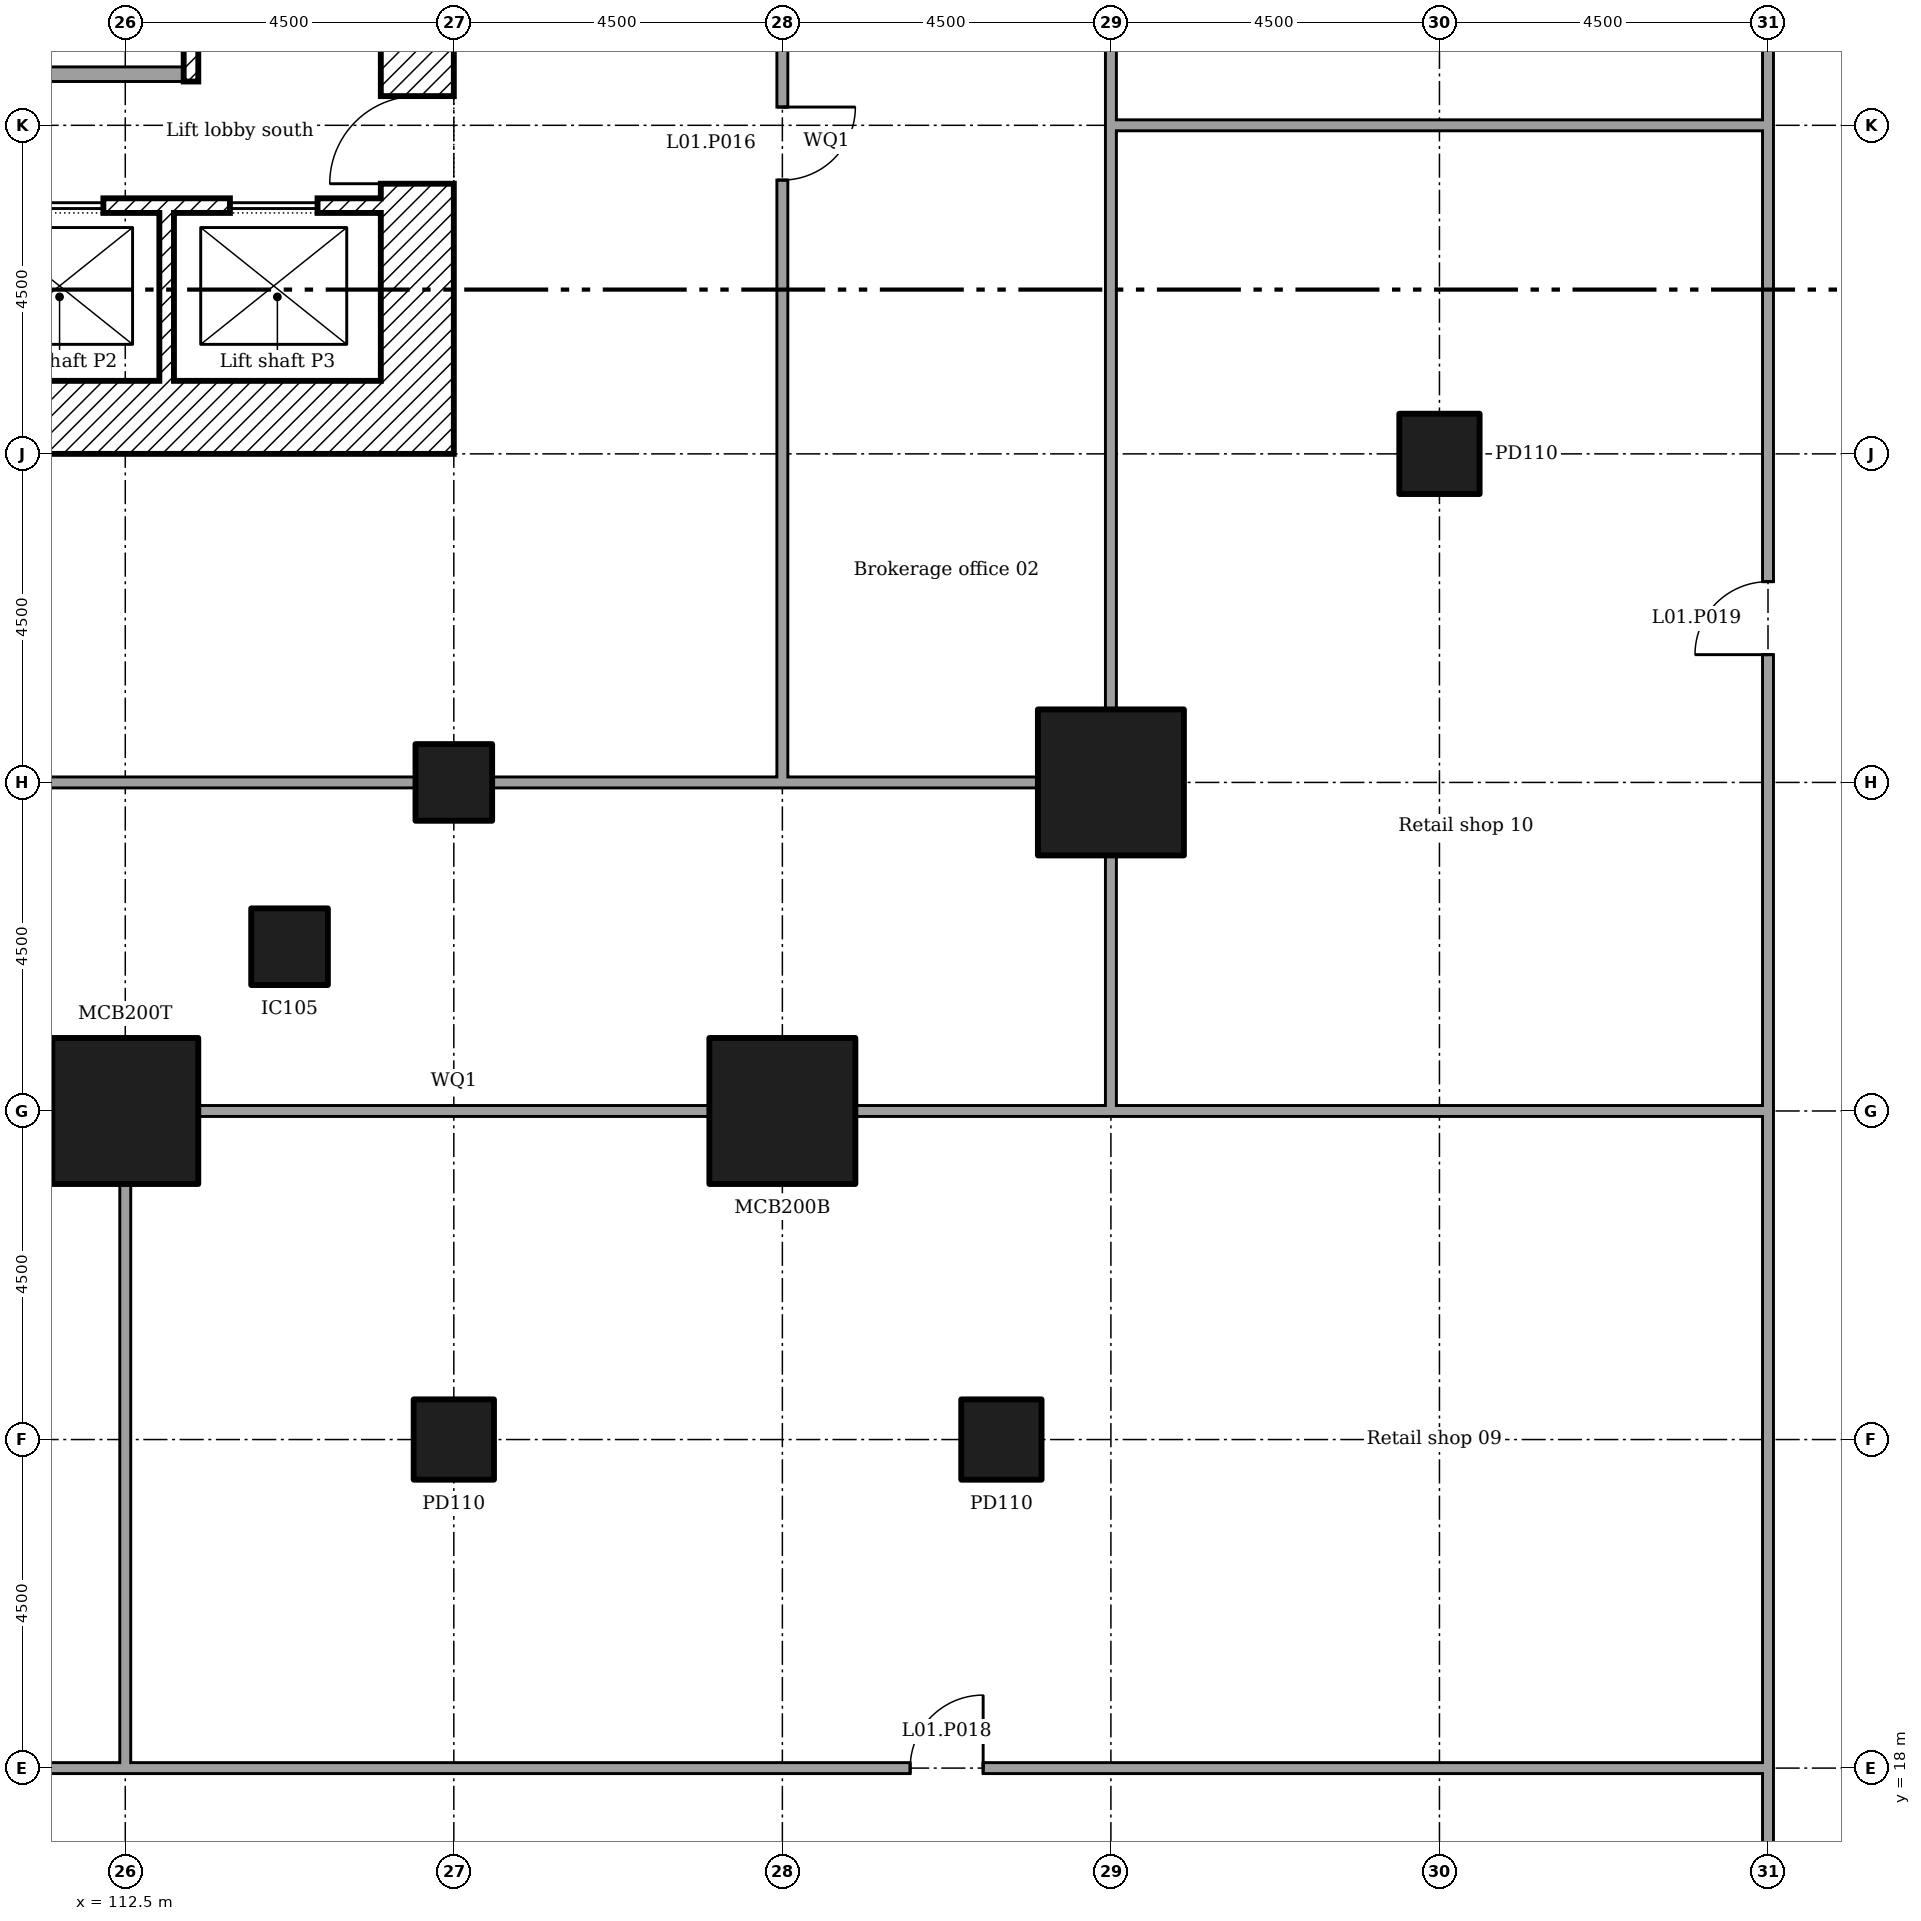
"""IFC4 building model, lengths in metres.
Left out: names, types, materials, properties, quantities, classifications, styles, units other than length and angle.
Written with IfcOpenShell. Run it as: python <this file> out.ifc"""

import sys

from ifc_helpers import new_model, si_unit, direction, frame, frame_2d, origin, origin_2d, place, context, subcontext, project, spatial, rectangle, extrude, element, fill, save


model = new_model("IFC4")
c1 = context("Model", 3, precision=1e-05, world=origin(), true_north=direction((0.0, 1.0)))
c2 = subcontext(c1, "Body", "Model", "MODEL_VIEW")
j1 = project(units=[si_unit("LENGTHUNIT", "METRE"), si_unit("PLANEANGLEUNIT", "RADIAN")], contexts=[c1])
p1 = place(None, origin())
s1 = spatial("IfcSite", under=j1, at=p1, CompositionType="ELEMENT")
p2 = place(p1, origin())
s2 = spatial("IfcBuilding", under=s1, at=p2, CompositionType="ELEMENT")
p3 = place(p2, frame((0.0, 0.0, 6.0)))
s3 = spatial("IfcBuildingStorey", under=s2, at=p3, CompositionType="ELEMENT", Elevation=6.0)
for number, where in (
    (1, (112.5, 27.0, 0.0)),
    (2, (121.5, 27.0, 0.0)),
    (3, (126.0, 31.5, 0.0)),
):
    element("IfcColumn", number, at=place(p3, frame(where)), inside=s3, PredefinedType="COLUMN", context=c2, shape_type="SweptSolid", body=[
        extrude(rectangle(XDim=2.0, YDim=2.0, at=origin_2d()), origin(), (0.0, 0.0, 1.0), 5.5),
    ])
for number, where in (
    (4, (114.75, 29.25, 0.0)),
    (5, (117.0, 31.5, 0.0)),
):
    element("IfcColumn", number, at=place(p3, frame(where)), inside=s3, PredefinedType="COLUMN", context=c2, shape_type="SweptSolid", body=[
        extrude(rectangle(XDim=1.05, YDim=1.05, at=origin_2d()), origin(), (0.0, 0.0, 1.0), 5.5),
    ])
for number, where in (
    (6, (117.0, 22.5, 0.0)),
    (7, (124.5, 22.5, 0.0)),
    (8, (130.5, 36.0, 0.0)),
):
    element("IfcColumn", number, at=place(p3, frame(where)), inside=s3, PredefinedType="COLUMN", context=c2, shape_type="SweptSolid", body=[
        extrude(rectangle(XDim=1.1, YDim=1.1, at=origin_2d()), origin(), (0.0, 0.0, 1.0), 5.5),
    ])
p4 = place(p3, frame((116.5, 36.0, 0.0), z_axis=(0.0, 0.0, 1.0), x_axis=(0.0, 1.0, 0.0)))
e9 = element("IfcWall", 9, at=p4, inside=s3, PredefinedType="SHEAR", context=c2, shape_type="SweptSolid", body=[
    extrude(rectangle(XDim=13.5, YDim=1.0, at=frame_2d((6.75, 0.0))), origin(), (0.0, 0.0, 1.0), 5.0),
])
p5 = place(p4, frame((3.7, 0.0, 0.0)))
e10 = element("IfcOpeningElement", 10, at=p5, cuts=e9, PredefinedType="OPENING", context=c2, shape_type="SweptSolid", body=[
    extrude(rectangle(XDim=1.2, YDim=2.1, at=frame_2d((0.6, 1.05))), frame((0.0, 0.51, 0.0), z_axis=(0.0, -1.0, 0.0), x_axis=(1.0, 0.0, 0.0)), (0.0, 0.0, 1.0), 1.02),
])
p6 = place(p4, frame((6.275, 0.0, 0.0)))
e11 = element("IfcOpeningElement", 11, at=p6, cuts=e9, PredefinedType="OPENING", context=c2, shape_type="SweptSolid", body=[
    extrude(rectangle(XDim=1.0, YDim=2.1, at=frame_2d((0.5, 1.05))), frame((0.0, 0.51, 0.0), z_axis=(0.0, -1.0, 0.0), x_axis=(1.0, 0.0, 0.0)), (0.0, 0.0, 1.0), 1.02),
])
p7 = place(p3, frame((104.5, 36.5, 0.0)))
e12 = element("IfcWall", 12, at=p7, inside=s3, PredefinedType="SHEAR", context=c2, shape_type="SweptSolid", body=[
    extrude(rectangle(XDim=11.5, YDim=1.0, at=frame_2d((5.75, 0.0))), origin(), (0.0, 0.0, 1.0), 5.0),
])
p8 = place(p3, frame((113.067, 37.0, 0.0), z_axis=(0.0, 0.0, 1.0), x_axis=(0.0, 1.0, 0.0)))
e13 = element("IfcWall", 13, at=p8, inside=s3, PredefinedType="SHEAR", context=c2, shape_type="SweptSolid", body=[
    extrude(rectangle(XDim=2.3, YDim=0.2, at=frame_2d((1.15, 0.0))), origin(), (0.0, 0.0, 1.0), 5.0),
])
p9 = place(p3, frame((107.2, 39.4, 0.0)))
e14 = element("IfcWall", 14, at=p9, inside=s3, PredefinedType="SHEAR", context=c2, shape_type="SweptSolid", body=[
    extrude(rectangle(XDim=8.8, YDim=0.2, at=frame_2d((4.4, 0.0))), origin(), (0.0, 0.0, 1.0), 5.0),
])
p10 = place(p9, frame((0.867, 0.0, 0.0)))
e15 = element("IfcOpeningElement", 15, at=p10, cuts=e14, PredefinedType="OPENING", context=c2, shape_type="SweptSolid", body=[
    extrude(rectangle(XDim=1.2, YDim=2.1, at=frame_2d((0.6, 1.05))), frame((0.0, 0.11, 0.0), z_axis=(0.0, -1.0, 0.0), x_axis=(1.0, 0.0, 0.0)), (0.0, 0.0, 1.0), 0.22),
])
p11 = place(p9, frame((3.8, 0.0, 0.0)))
e16 = element("IfcOpeningElement", 16, at=p11, cuts=e14, PredefinedType="OPENING", context=c2, shape_type="SweptSolid", body=[
    extrude(rectangle(XDim=1.2, YDim=2.1, at=frame_2d((0.6, 1.05))), frame((0.0, 0.11, 0.0), z_axis=(0.0, -1.0, 0.0), x_axis=(1.0, 0.0, 0.0)), (0.0, 0.0, 1.0), 0.22),
])
p12 = place(p9, frame((6.733, 0.0, 0.0)))
e17 = element("IfcOpeningElement", 17, at=p12, cuts=e14, PredefinedType="OPENING", context=c2, shape_type="SweptSolid", body=[
    extrude(rectangle(XDim=1.2, YDim=2.1, at=frame_2d((0.6, 1.05))), frame((0.0, 0.11, 0.0), z_axis=(0.0, -1.0, 0.0), x_axis=(1.0, 0.0, 0.0)), (0.0, 0.0, 1.0), 0.22),
])
p13 = place(p3, frame((113.4, 41.1, 0.0), z_axis=(0.0, 0.0, 1.0), x_axis=(0.0, 1.0, 0.0)))
e18 = element("IfcWall", 18, at=p13, inside=s3, PredefinedType="SHEAR", context=c2, shape_type="SweptSolid", body=[
    extrude(rectangle(XDim=7.4, YDim=0.2, at=frame_2d((3.7, 0.0))), origin(), (0.0, 0.0, 1.0), 5.0),
])
p14 = place(p3, frame((107.2, 41.2, 0.0)))
e19 = element("IfcWall", 19, at=p14, inside=s3, PredefinedType="PARTITIONING", context=c2, shape_type="SweptSolid", body=[
    extrude(rectangle(XDim=6.1, YDim=0.2, at=frame_2d((3.05, 0.0))), origin(), (0.0, 0.0, 1.0), 5.0),
])
p15 = place(p14, frame((1.2, 0.0, 0.0)))
e20 = element("IfcOpeningElement", 20, at=p15, cuts=e19, PredefinedType="OPENING", context=c2, shape_type="SweptSolid", body=[
    extrude(rectangle(XDim=0.9, YDim=2.1, at=frame_2d((0.45, 1.05))), frame((0.0, 0.11, 0.0), z_axis=(0.0, -1.0, 0.0), x_axis=(1.0, 0.0, 0.0)), (0.0, 0.0, 1.0), 0.22),
])
p16 = place(p3, frame((135.0, 9.3, 0.0), z_axis=(0.0, 0.0, 1.0), x_axis=(0.0, 1.0, 0.0)))
e21 = element("IfcWall", 21, at=p16, inside=s3, PredefinedType="PARTITIONING", context=c2, shape_type="SweptSolid", body=[
    extrude(rectangle(XDim=8.775, YDim=0.15, at=frame_2d((4.387, 0.0))), origin(), (0.0, 0.0, 1.0), 5.05),
])
p17 = place(p16, frame((3.45, 0.0, 0.0)))
e22 = element("IfcOpeningElement", 22, at=p17, cuts=e21, PredefinedType="OPENING", context=c2, shape_type="SweptSolid", body=[
    extrude(rectangle(XDim=1.8, YDim=2.1, at=frame_2d((0.9, 1.05))), frame((0.0, 0.085, 0.0), z_axis=(0.0, -1.0, 0.0), x_axis=(1.0, 0.0, 0.0)), (0.0, 0.0, 1.0), 0.17),
])
p18 = place(p3, frame((94.575, 18.0, 0.0)))
e23 = element("IfcWall", 23, at=p18, inside=s3, PredefinedType="PARTITIONING", context=c2, shape_type="SweptSolid", body=[
    extrude(rectangle(XDim=18.0, YDim=0.15, at=frame_2d((9.0, 0.0))), origin(), (0.0, 0.0, 1.0), 5.05),
])
p19 = place(p18, frame((8.425, 0.0, 0.0)))
e24 = element("IfcOpeningElement", 24, at=p19, cuts=e23, PredefinedType="OPENING", context=c2, shape_type="SweptSolid", body=[
    extrude(rectangle(XDim=1.0, YDim=2.1, at=frame_2d((0.5, 1.05))), frame((0.0, 0.085, 0.0), z_axis=(0.0, -1.0, 0.0), x_axis=(1.0, 0.0, 0.0)), (0.0, 0.0, 1.0), 0.17),
])
p20 = place(p3, frame((112.5, 18.0, 0.0)))
e25 = element("IfcWall", 25, at=p20, inside=s3, PredefinedType="PARTITIONING", context=c2, shape_type="SweptSolid", body=[
    extrude(rectangle(XDim=22.425, YDim=0.15, at=frame_2d((11.212, 0.0))), origin(), (0.0, 0.0, 1.0), 5.05),
])
p21 = place(p20, frame((10.75, 0.0, 0.0)))
e26 = element("IfcOpeningElement", 26, at=p21, cuts=e25, PredefinedType="OPENING", context=c2, shape_type="SweptSolid", body=[
    extrude(rectangle(XDim=1.0, YDim=2.1, at=frame_2d((0.5, 1.05))), frame((0.0, 0.085, 0.0), z_axis=(0.0, -1.0, 0.0), x_axis=(1.0, 0.0, 0.0)), (0.0, 0.0, 1.0), 0.17),
])
p22 = place(p3, frame((135.0, 18.0, 0.0), z_axis=(0.0, 0.0, 1.0), x_axis=(0.0, 1.0, 0.0)))
e27 = element("IfcWall", 27, at=p22, inside=s3, PredefinedType="PARTITIONING", context=c2, shape_type="SweptSolid", body=[
    extrude(rectangle(XDim=9.075, YDim=0.15, at=frame_2d((4.538, 0.0))), origin(), (0.0, 0.0, 1.0), 5.05),
])
p23 = place(p3, frame((135.0, 27.0, 0.0), z_axis=(0.0, 0.0, 1.0), x_axis=(0.0, 1.0, 0.0)))
e28 = element("IfcWall", 28, at=p23, inside=s3, PredefinedType="PARTITIONING", context=c2, shape_type="SweptSolid", body=[
    extrude(rectangle(XDim=13.575, YDim=0.15, at=frame_2d((6.788, 0.0))), origin(), (0.0, 0.0, 1.0), 5.05),
])
p24 = place(p23, frame((6.25, 0.0, 0.0)))
e29 = element("IfcOpeningElement", 29, at=p24, cuts=e28, PredefinedType="OPENING", context=c2, shape_type="SweptSolid", body=[
    extrude(rectangle(XDim=1.0, YDim=2.1, at=frame_2d((0.5, 1.05))), frame((0.0, 0.085, 0.0), z_axis=(0.0, -1.0, 0.0), x_axis=(1.0, 0.0, 0.0)), (0.0, 0.0, 1.0), 0.17),
])
p25 = place(p3, frame((135.0, 40.5, 0.0), z_axis=(0.0, 0.0, 1.0), x_axis=(0.0, 1.0, 0.0)))
e30 = element("IfcWall", 30, at=p25, inside=s3, PredefinedType="PARTITIONING", context=c2, shape_type="SweptSolid", body=[
    extrude(rectangle(XDim=18.075, YDim=0.15, at=frame_2d((9.038, 0.0))), origin(), (0.0, 0.0, 1.0), 5.05),
])
p26 = place(p25, frame((7.3, 0.0, 0.0)))
e31 = element("IfcOpeningElement", 31, at=p26, cuts=e30, PredefinedType="OPENING", context=c2, shape_type="SweptSolid", body=[
    extrude(rectangle(XDim=1.0, YDim=2.1, at=frame_2d((0.5, 1.05))), frame((0.0, 0.085, 0.0), z_axis=(0.0, -1.0, 0.0), x_axis=(1.0, 0.0, 0.0)), (0.0, 0.0, 1.0), 0.17),
])
p27 = place(p3, frame((99.075, 31.5, 0.0)))
e32 = element("IfcWall", 32, at=p27, inside=s3, PredefinedType="PARTITIONING", context=c2, shape_type="SweptSolid", body=[
    extrude(rectangle(XDim=17.405, YDim=0.15, at=frame_2d((8.703, 0.0))), origin(), (0.0, 0.0, 1.0), 5.05),
])
p28 = place(p27, frame((8.175, 0.0, 0.0)))
e33 = element("IfcOpeningElement", 33, at=p28, cuts=e32, PredefinedType="OPENING", context=c2, shape_type="SweptSolid", body=[
    extrude(rectangle(XDim=1.0, YDim=2.1, at=frame_2d((0.5, 1.05))), frame((0.0, 0.085, 0.0), z_axis=(0.0, -1.0, 0.0), x_axis=(1.0, 0.0, 0.0)), (0.0, 0.0, 1.0), 0.17),
])
p29 = place(p3, frame((117.52, 31.5, 0.0)))
e34 = element("IfcWall", 34, at=p29, inside=s3, PredefinedType="PARTITIONING", context=c2, shape_type="SweptSolid", body=[
    extrude(rectangle(XDim=4.055, YDim=0.15, at=frame_2d((2.027, 0.0))), origin(), (0.0, 0.0, 1.0), 5.05),
])
p30 = place(p3, frame((121.5, 31.575, 0.0), z_axis=(0.0, 0.0, 1.0), x_axis=(0.0, 1.0, 0.0)))
e35 = element("IfcWall", 35, at=p30, inside=s3, PredefinedType="PARTITIONING", context=c2, shape_type="SweptSolid", body=[
    extrude(rectangle(XDim=17.405, YDim=0.15, at=frame_2d((8.703, 0.0))), origin(), (0.0, 0.0, 1.0), 5.05),
])
p31 = place(p30, frame((8.175, 0.0, 0.0)))
e36 = element("IfcOpeningElement", 36, at=p31, cuts=e35, PredefinedType="OPENING", context=c2, shape_type="SweptSolid", body=[
    extrude(rectangle(XDim=1.0, YDim=2.1, at=frame_2d((0.5, 1.05))), frame((0.0, 0.085, 0.0), z_axis=(0.0, -1.0, 0.0), x_axis=(1.0, 0.0, 0.0)), (0.0, 0.0, 1.0), 0.17),
])
p32 = place(p3, frame((121.5, 31.5, 0.0)))
e37 = element("IfcWall", 37, at=p32, inside=s3, PredefinedType="PARTITIONING", context=c2, shape_type="SweptSolid", body=[
    extrude(rectangle(XDim=3.505, YDim=0.15, at=frame_2d((1.752, 0.0))), origin(), (0.0, 0.0, 1.0), 5.05),
])
p33 = place(p3, frame((99.995, 27.0, 0.0)))
e38 = element("IfcWall", 38, at=p33, inside=s3, PredefinedType="PARTITIONING", context=c2, shape_type="SweptSolid", body=[
    extrude(rectangle(XDim=11.51, YDim=0.15, at=frame_2d((5.755, 0.0))), origin(), (0.0, 0.0, 1.0), 5.05),
])
p34 = place(p3, frame((113.495, 27.0, 0.0)))
e39 = element("IfcWall", 39, at=p34, inside=s3, PredefinedType="PARTITIONING", context=c2, shape_type="SweptSolid", body=[
    extrude(rectangle(XDim=7.01, YDim=0.15, at=frame_2d((3.505, 0.0))), origin(), (0.0, 0.0, 1.0), 5.05),
])
p35 = place(p3, frame((122.495, 27.0, 0.0)))
e40 = element("IfcWall", 40, at=p35, inside=s3, PredefinedType="PARTITIONING", context=c2, shape_type="SweptSolid", body=[
    extrude(rectangle(XDim=3.58, YDim=0.15, at=frame_2d((1.79, 0.0))), origin(), (0.0, 0.0, 1.0), 5.05),
])
p36 = place(p3, frame((126.0, 27.075, 0.0), z_axis=(0.0, 0.0, 1.0), x_axis=(0.0, 1.0, 0.0)))
e41 = element("IfcWall", 41, at=p36, inside=s3, PredefinedType="PARTITIONING", context=c2, shape_type="SweptSolid", body=[
    extrude(rectangle(XDim=3.43, YDim=0.15, at=frame_2d((1.715, 0.0))), origin(), (0.0, 0.0, 1.0), 5.05),
])
p37 = place(p3, frame((126.0, 32.495, 0.0), z_axis=(0.0, 0.0, 1.0), x_axis=(0.0, 1.0, 0.0)))
e42 = element("IfcWall", 42, at=p37, inside=s3, PredefinedType="PARTITIONING", context=c2, shape_type="SweptSolid", body=[
    extrude(rectangle(XDim=8.08, YDim=0.15, at=frame_2d((4.04, 0.0))), origin(), (0.0, 0.0, 1.0), 5.05),
])
p38 = place(p3, frame((126.0, 40.5, 0.0), z_axis=(0.0, 0.0, 1.0), x_axis=(0.0, 1.0, 0.0)))
e43 = element("IfcWall", 43, at=p38, inside=s3, PredefinedType="PARTITIONING", context=c2, shape_type="SweptSolid", body=[
    extrude(rectangle(XDim=3.505, YDim=0.15, at=frame_2d((1.752, 0.0))), origin(), (0.0, 0.0, 1.0), 5.05),
])
p39 = place(p3, frame((112.5, 18.075, 0.0), z_axis=(0.0, 0.0, 1.0), x_axis=(0.0, 1.0, 0.0)))
e44 = element("IfcWall", 44, at=p39, inside=s3, PredefinedType="PARTITIONING", context=c2, shape_type="SweptSolid", body=[
    extrude(rectangle(XDim=7.93, YDim=0.15, at=frame_2d((3.965, 0.0))), origin(), (0.0, 0.0, 1.0), 5.05),
])
p40 = place(p3, frame((126.0, 27.0, 0.0)))
e45 = element("IfcWall", 45, at=p40, inside=s3, PredefinedType="PARTITIONING", context=c2, shape_type="SweptSolid", body=[
    extrude(rectangle(XDim=8.925, YDim=0.15, at=frame_2d((4.462, 0.0))), origin(), (0.0, 0.0, 1.0), 5.05),
])
p41 = place(p3, frame((126.075, 40.5, 0.0)))
e46 = element("IfcWall", 46, at=p41, inside=s3, PredefinedType="PARTITIONING", context=c2, shape_type="SweptSolid", body=[
    extrude(rectangle(XDim=8.85, YDim=0.15, at=frame_2d((4.425, 0.0))), origin(), (0.0, 0.0, 1.0), 5.05),
])
p42 = place(p5, origin())
e47 = element("IfcDoor", 47, at=p42, inside=s3, OperationType="SINGLE_SWING_RIGHT", PredefinedType="DOOR", context=c2, shape_type="SweptSolid", body=[
    extrude(rectangle(XDim=1.2, YDim=2.1, at=frame_2d((0.6, 1.05))), frame((0.0, 0.025, 0.0), z_axis=(0.0, -1.0, 0.0), x_axis=(1.0, 0.0, 0.0)), (0.0, 0.0, 1.0), 0.05),
])
fill(e10, e47)
p43 = place(p11, origin())
e48 = element("IfcDoor", 48, at=p43, inside=s3, OperationType="SLIDING_TO_LEFT", PredefinedType="DOOR", context=c2, shape_type="SweptSolid", body=[
    extrude(rectangle(XDim=1.2, YDim=2.1, at=frame_2d((0.6, 1.05))), frame((0.0, 0.025, 0.0), z_axis=(0.0, -1.0, 0.0), x_axis=(1.0, 0.0, 0.0)), (0.0, 0.0, 1.0), 0.05),
])
fill(e16, e48)
p44 = place(p12, origin())
e49 = element("IfcDoor", 49, at=p44, inside=s3, OperationType="SLIDING_TO_LEFT", PredefinedType="DOOR", context=c2, shape_type="SweptSolid", body=[
    extrude(rectangle(XDim=1.2, YDim=2.1, at=frame_2d((0.6, 1.05))), frame((0.0, 0.025, 0.0), z_axis=(0.0, -1.0, 0.0), x_axis=(1.0, 0.0, 0.0)), (0.0, 0.0, 1.0), 0.05),
])
fill(e17, e49)
p45 = place(p31, frame((1.0, 0.0, 0.0), x_axis=(-1.0, 0.0, 0.0)))
e50 = element("IfcDoor", 50, at=p45, inside=s3, OperationType="SINGLE_SWING_RIGHT", PredefinedType="DOOR", context=c2, shape_type="SweptSolid", body=[
    extrude(rectangle(XDim=1.0, YDim=2.1, at=frame_2d((0.5, 1.05))), frame((0.0, 0.025, 0.0), z_axis=(0.0, -1.0, 0.0), x_axis=(1.0, 0.0, 0.0)), (0.0, 0.0, 1.0), 0.05),
])
fill(e36, e50)
p46 = place(p21, origin())
e51 = element("IfcDoor", 51, at=p46, inside=s3, OperationType="SINGLE_SWING_LEFT", PredefinedType="DOOR", context=c2, shape_type="SweptSolid", body=[
    extrude(rectangle(XDim=1.0, YDim=2.1, at=frame_2d((0.5, 1.05))), frame((0.0, 0.025, 0.0), z_axis=(0.0, -1.0, 0.0), x_axis=(1.0, 0.0, 0.0)), (0.0, 0.0, 1.0), 0.05),
])
fill(e26, e51)
p47 = place(p24, origin())
e52 = element("IfcDoor", 52, at=p47, inside=s3, OperationType="SINGLE_SWING_RIGHT", PredefinedType="DOOR", context=c2, shape_type="SweptSolid", body=[
    extrude(rectangle(XDim=1.0, YDim=2.1, at=frame_2d((0.5, 1.05))), frame((0.0, 0.025, 0.0), z_axis=(0.0, -1.0, 0.0), x_axis=(1.0, 0.0, 0.0)), (0.0, 0.0, 1.0), 0.05),
])
fill(e29, e52)
save(model, sys.argv[1])
